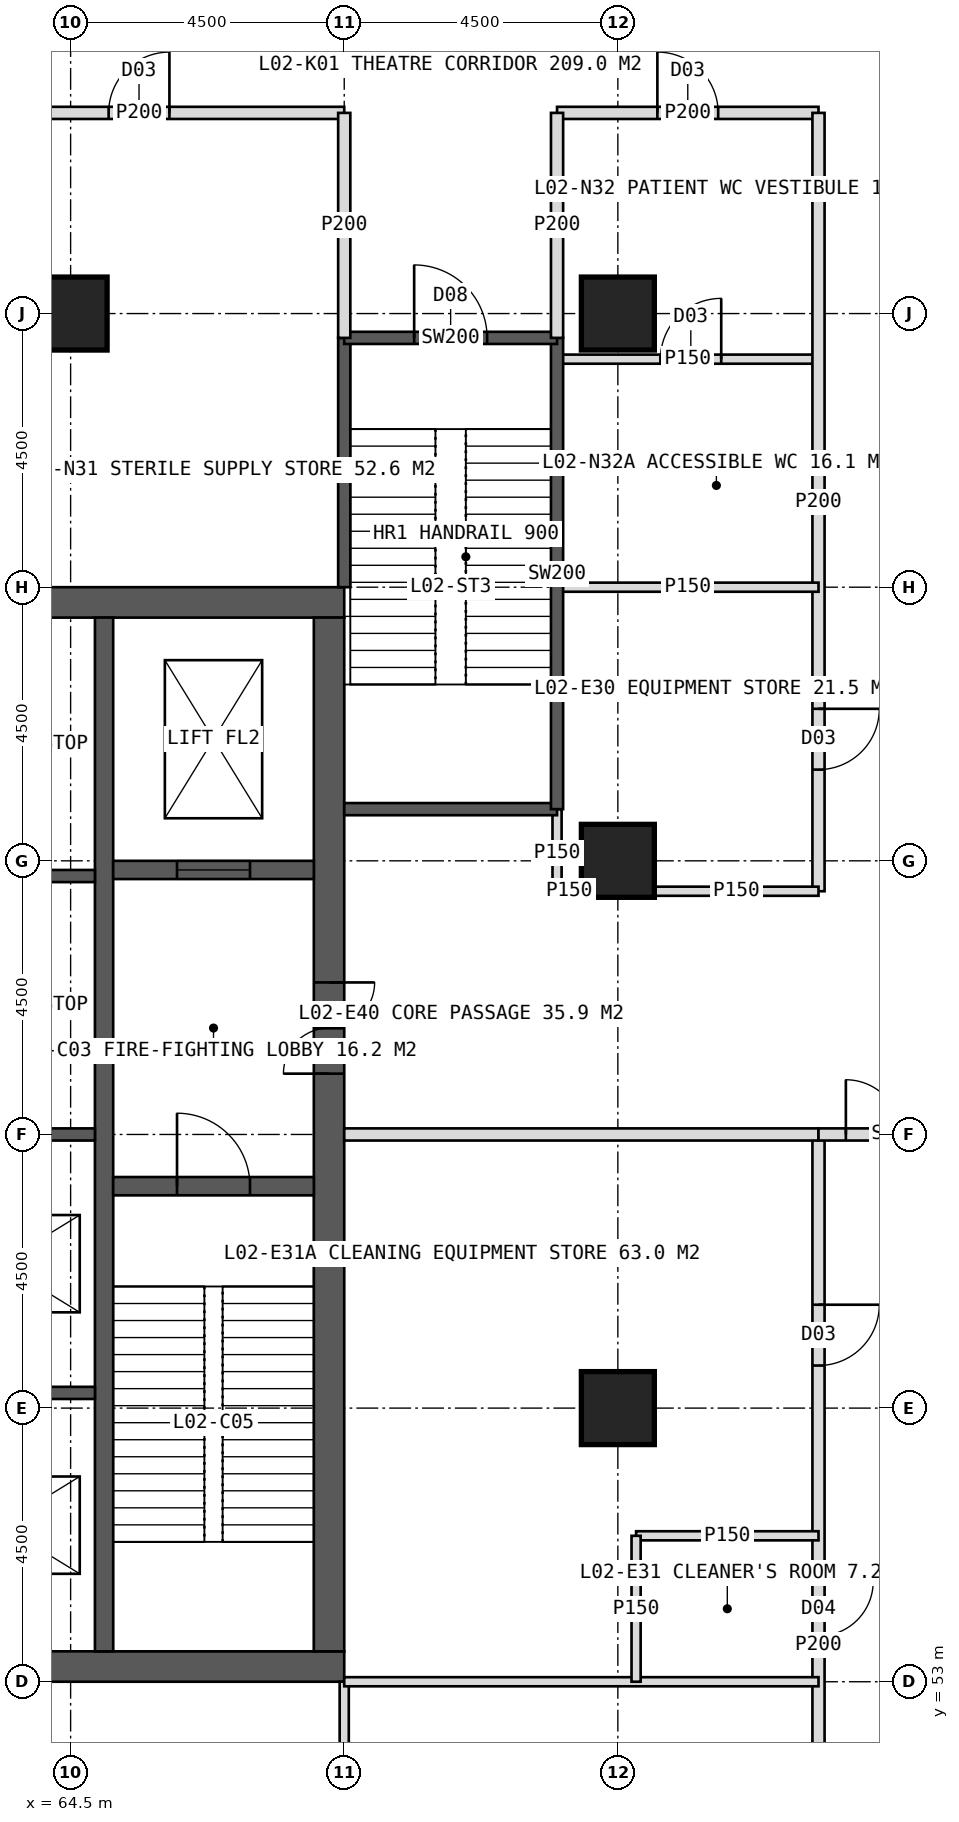
"""IFC4 building model, lengths in metres.
Left out: names, types, materials, properties, quantities, classifications, styles, units other than length and angle.
Written with IfcOpenShell. Run it as: python <this file> out.ifc"""

import sys

from ifc_helpers import new_model, si_unit, direction, frame, frame_2d, origin, origin_2d, place, context, subcontext, project, spatial, rectangle, hollow_rectangle, extrude, element, fill, save


model = new_model("IFC4")
c1 = context("Model", 3, precision=1e-05, world=origin(), true_north=direction((0.0, 1.0)))
c2 = subcontext(c1, "Body", "Model", "MODEL_VIEW")
j1 = project(units=[si_unit("LENGTHUNIT", "METRE"), si_unit("PLANEANGLEUNIT", "RADIAN")], contexts=[c1])
p1 = place(None, origin())
s1 = spatial("IfcSite", under=j1, at=p1, CompositionType="ELEMENT")
p2 = place(p1, origin())
s2 = spatial("IfcBuilding", under=s1, at=p2, CompositionType="ELEMENT")
p3 = place(p2, frame((0.0, 0.0, 11.0)))
s3 = spatial("IfcBuildingStorey", under=s2, at=p3, CompositionType="ELEMENT", Elevation=11.0)
p4 = place(p3, frame((51.0, 70.75, 0.0), z_axis=(0.0, 0.0, 1.0), x_axis=(1.0, 0.0, 0.0)))
e1 = element("IfcWall", 1, at=p4, inside=s3, PredefinedType="SHEAR", context=c2, shape_type="SweptSolid", body=[
    extrude(rectangle(XDim=18.0, YDim=0.5, at=frame_2d((9.0, 0.0))), origin(), (0.0, 0.0, 1.0), 5.5),
])
p5 = place(p4, frame((8.1, 0.0, 0.0)))
e2 = element("IfcOpeningElement", 2, at=p5, cuts=e1, PredefinedType="OPENING", context=c2, shape_type="SweptSolid", body=[
    extrude(rectangle(XDim=1.8, YDim=2.2, at=frame_2d((0.9, 1.1))), frame((0.0, 0.26, 0.0), z_axis=(0.0, -1.0, 0.0), x_axis=(1.0, 0.0, 0.0)), (0.0, 0.0, 1.0), 0.52),
])
p6 = place(p3, frame((51.0, 53.25, 0.0), z_axis=(0.0, 0.0, 1.0), x_axis=(1.0, 0.0, 0.0)))
e3 = element("IfcWall", 3, at=p6, inside=s3, PredefinedType="SHEAR", context=c2, shape_type="SweptSolid", body=[
    extrude(rectangle(XDim=18.0, YDim=0.5, at=frame_2d((9.0, 0.0))), origin(), (0.0, 0.0, 1.0), 5.5),
])
p7 = place(p6, frame((8.1, 0.0, 0.0)))
e4 = element("IfcOpeningElement", 4, at=p7, cuts=e3, PredefinedType="OPENING", context=c2, shape_type="SweptSolid", body=[
    extrude(rectangle(XDim=1.8, YDim=2.2, at=frame_2d((0.9, 1.1))), frame((0.0, 0.26, 0.0), z_axis=(0.0, -1.0, 0.0), x_axis=(1.0, 0.0, 0.0)), (0.0, 0.0, 1.0), 0.52),
])
p8 = place(p3, frame((68.75, 53.5, 0.0), z_axis=(0.0, 0.0, 1.0), x_axis=(0.0, 1.0, 0.0)))
e5 = element("IfcWall", 5, at=p8, inside=s3, PredefinedType="SHEAR", context=c2, shape_type="SweptSolid", body=[
    extrude(rectangle(XDim=17.0, YDim=0.5, at=frame_2d((8.5, 0.0))), origin(), (0.0, 0.0, 1.0), 5.5),
])
p9 = place(p8, frame((9.5, 0.0, 0.0)))
e6 = element("IfcOpeningElement", 6, at=p9, cuts=e5, PredefinedType="OPENING", context=c2, shape_type="SweptSolid", body=[
    extrude(rectangle(XDim=1.5, YDim=2.2, at=frame_2d((0.75, 1.1))), frame((0.0, 0.26, 0.0), z_axis=(0.0, -1.0, 0.0), x_axis=(1.0, 0.0, 0.0)), (0.0, 0.0, 1.0), 0.52),
])
p10 = place(p3, frame((65.05, 53.5, 0.0), z_axis=(0.0, 0.0, 1.0), x_axis=(0.0, 1.0, 0.0)))
e7 = element("IfcWall", 7, at=p10, inside=s3, PredefinedType="SHEAR", context=c2, shape_type="SweptSolid", body=[
    extrude(rectangle(XDim=17.0, YDim=0.3, at=frame_2d((8.5, 0.0))), origin(), (0.0, 0.0, 1.0), 5.5),
])
for number, where, z_axis, x_axis in (
    (8, (61.85, 57.75, 0.0), (0.0, 0.0, 1.0), (1.0, 0.0, 0.0)),
    (9, (61.85, 62.0, 0.0), (0.0, 0.0, 1.0), (1.0, 0.0, 0.0)),
    (10, (61.85, 66.25, 0.0), (0.0, 0.0, 1.0), (1.0, 0.0, 0.0)),
):
    element("IfcWall", number, at=place(p3, frame(where, z_axis=z_axis, x_axis=x_axis)), inside=s3, PredefinedType="SHEAR", context=c2, shape_type="SweptSolid", body=[
        extrude(rectangle(XDim=3.05, YDim=0.2, at=frame_2d((1.525, 0.0))), origin(), (0.0, 0.0, 1.0), 5.5),
    ])
p11 = place(p3, frame((65.2, 61.15, 0.0), z_axis=(0.0, 0.0, 1.0), x_axis=(1.0, 0.0, 0.0)))
e11 = element("IfcWall", 11, at=p11, inside=s3, PredefinedType="SHEAR", context=c2, shape_type="SweptSolid", body=[
    extrude(rectangle(XDim=3.3, YDim=0.3, at=frame_2d((1.65, 0.0))), origin(), (0.0, 0.0, 1.0), 5.5),
])
p12 = place(p11, frame((1.05, 0.0, 0.0)))
e12 = element("IfcOpeningElement", 12, at=p12, cuts=e11, PredefinedType="OPENING", context=c2, shape_type="SweptSolid", body=[
    extrude(rectangle(XDim=1.2, YDim=2.1, at=frame_2d((0.6, 1.05))), frame((0.0, 0.16, 0.0), z_axis=(0.0, -1.0, 0.0), x_axis=(1.0, 0.0, 0.0)), (0.0, 0.0, 1.0), 0.32),
])
p13 = place(p3, frame((65.2, 66.35, 0.0), z_axis=(0.0, 0.0, 1.0), x_axis=(1.0, 0.0, 0.0)))
e13 = element("IfcWall", 13, at=p13, inside=s3, PredefinedType="SHEAR", context=c2, shape_type="SweptSolid", body=[
    extrude(rectangle(XDim=3.3, YDim=0.3, at=frame_2d((1.65, 0.0))), origin(), (0.0, 0.0, 1.0), 5.5),
])
p14 = place(p13, frame((1.05, 0.0, 0.0)))
e14 = element("IfcOpeningElement", 14, at=p14, cuts=e13, PredefinedType="OPENING", context=c2, shape_type="SweptSolid", body=[
    extrude(rectangle(XDim=1.2, YDim=2.2, at=frame_2d((0.6, 1.1))), frame((0.0, 0.16, 0.0), z_axis=(0.0, -1.0, 0.0), x_axis=(1.0, 0.0, 0.0)), (0.0, 0.0, 1.0), 0.32),
])
for number, where, z_axis, x_axis in (
    (15, (73.5, 75.5, 0.0), (0.0, 0.0, 1.0), (1.0, 0.0, 0.0)),
    (16, (64.5, 75.5, 0.0), (0.0, 0.0, 1.0), (1.0, 0.0, 0.0)),
    (17, (73.5, 57.5, 0.0), (0.0, 0.0, 1.0), (1.0, 0.0, 0.0)),
    (18, (73.5, 66.5, 0.0), (0.0, 0.0, 1.0), (1.0, 0.0, 0.0)),
):
    element("IfcColumn", number, at=place(p3, frame(where, z_axis=z_axis, x_axis=x_axis)), inside=s3, PredefinedType="COLUMN", context=c2, shape_type="SweptSolid", body=[
        extrude(hollow_rectangle(XDim=1.2, YDim=1.2, WallThickness=0.1, at=origin_2d()), origin(), (0.0, 0.0, 1.0), 5.5),
    ])
p15 = place(p3, frame((62.25, 78.8, 0.0), z_axis=(0.0, 0.0, 1.0), x_axis=(1.0, 0.0, 0.0)))
e19 = element("IfcWall", 19, at=p15, inside=s3, PredefinedType="PARTITIONING", context=c2, shape_type="SweptSolid", body=[
    extrude(rectangle(XDim=6.75, YDim=0.2, at=frame_2d((3.375, 0.0))), origin(), (0.0, 0.0, 1.0), 5.2),
])
p16 = place(p15, frame((2.875, 0.0, 0.0)))
e20 = element("IfcOpeningElement", 20, at=p16, cuts=e19, PredefinedType="OPENING", context=c2, shape_type="SweptSolid", body=[
    extrude(rectangle(XDim=1.0, YDim=2.1, at=frame_2d((0.5, 1.05))), frame((0.0, 0.11, 0.0), z_axis=(0.0, -1.0, 0.0), x_axis=(1.0, 0.0, 0.0)), (0.0, 0.0, 1.0), 0.22),
])
p17 = place(p3, frame((72.5, 78.8, 0.0), z_axis=(0.0, 0.0, 1.0), x_axis=(1.0, 0.0, 0.0)))
e21 = element("IfcWall", 21, at=p17, inside=s3, PredefinedType="PARTITIONING", context=c2, shape_type="SweptSolid", body=[
    extrude(rectangle(XDim=4.3, YDim=0.2, at=frame_2d((2.15, 0.0))), origin(), (0.0, 0.0, 1.0), 5.2),
])
p18 = place(p17, frame((1.65, 0.0, 0.0)))
e22 = element("IfcOpeningElement", 22, at=p18, cuts=e21, PredefinedType="OPENING", context=c2, shape_type="SweptSolid", body=[
    extrude(rectangle(XDim=1.0, YDim=2.1, at=frame_2d((0.5, 1.05))), frame((0.0, 0.11, 0.0), z_axis=(0.0, -1.0, 0.0), x_axis=(1.0, 0.0, 0.0)), (0.0, 0.0, 1.0), 0.22),
])
p19 = place(p3, frame((72.5, 74.75, 0.0), z_axis=(0.0, 0.0, 1.0), x_axis=(1.0, 0.0, 0.0)))
e23 = element("IfcWall", 23, at=p19, inside=s3, PredefinedType="PARTITIONING", context=c2, shape_type="SweptSolid", body=[
    extrude(rectangle(XDim=4.3, YDim=0.15, at=frame_2d((2.15, 0.0))), origin(), (0.0, 0.0, 1.0), 5.2),
])
p20 = place(p19, frame((1.7, 0.0, 0.0)))
e24 = element("IfcOpeningElement", 24, at=p20, cuts=e23, PredefinedType="OPENING", context=c2, shape_type="SweptSolid", body=[
    extrude(rectangle(XDim=1.0, YDim=2.1, at=frame_2d((0.5, 1.05))), frame((0.0, 0.085, 0.0), z_axis=(0.0, -1.0, 0.0), x_axis=(1.0, 0.0, 0.0)), (0.0, 0.0, 1.0), 0.17),
])
p21 = place(p3, frame((69.0, 53.0, 0.0), z_axis=(0.0, 0.0, 1.0), x_axis=(0.0, -1.0, 0.0)))
e25 = element("IfcWall", 25, at=p21, inside=s3, PredefinedType="PARTITIONING", context=c2, shape_type="SweptSolid", body=[
    extrude(rectangle(XDim=7.8, YDim=0.15, at=frame_2d((3.9, 0.0))), origin(), (0.0, 0.0, 1.0), 5.2),
])
p22 = place(p3, frame((76.8, 78.8, 0.0), z_axis=(0.0, 0.0, 1.0), x_axis=(0.0, -1.0, 0.0)))
e26 = element("IfcWall", 26, at=p22, inside=s3, PredefinedType="PARTITIONING", context=c2, shape_type="SweptSolid", body=[
    extrude(rectangle(XDim=12.8, YDim=0.2, at=frame_2d((6.4, 0.0))), origin(), (0.0, 0.0, 1.0), 5.2),
])
p23 = place(p22, frame((9.8, 0.0, 0.0)))
e27 = element("IfcOpeningElement", 27, at=p23, cuts=e26, PredefinedType="OPENING", context=c2, shape_type="SweptSolid", body=[
    extrude(rectangle(XDim=1.0, YDim=2.1, at=frame_2d((0.5, 1.05))), frame((0.0, 0.11, 0.0), z_axis=(0.0, -1.0, 0.0), x_axis=(1.0, 0.0, 0.0)), (0.0, 0.0, 1.0), 0.22),
])
p24 = place(p3, frame((76.8, 62.0, 0.0), z_axis=(0.0, 0.0, 1.0), x_axis=(0.0, -1.0, 0.0)))
e28 = element("IfcWall", 28, at=p24, inside=s3, PredefinedType="PARTITIONING", context=c2, shape_type="SweptSolid", body=[
    extrude(rectangle(XDim=16.8, YDim=0.2, at=frame_2d((8.4, 0.0))), origin(), (0.0, 0.0, 1.0), 5.2),
])
p25 = place(p24, frame((12.4, 0.0, 0.0)))
e29 = element("IfcOpeningElement", 29, at=p25, cuts=e28, PredefinedType="OPENING", context=c2, shape_type="SweptSolid", body=[
    extrude(rectangle(XDim=1.0, YDim=2.1, at=frame_2d((0.5, 1.05))), frame((0.0, 0.11, 0.0), z_axis=(0.0, -1.0, 0.0), x_axis=(1.0, 0.0, 0.0)), (0.0, 0.0, 1.0), 0.22),
])
p26 = place(p24, frame((7.35, 0.0, 0.0)))
e30 = element("IfcOpeningElement", 30, at=p26, cuts=e28, PredefinedType="OPENING", context=c2, shape_type="SweptSolid", body=[
    extrude(rectangle(XDim=0.9, YDim=2.1, at=frame_2d((0.45, 1.05))), frame((0.0, 0.11, 0.0), z_axis=(0.0, -1.0, 0.0), x_axis=(1.0, 0.0, 0.0)), (0.0, 0.0, 1.0), 0.22),
])
p27 = place(p24, frame((2.8, 0.0, 0.0)))
e31 = element("IfcOpeningElement", 31, at=p27, cuts=e28, PredefinedType="OPENING", context=c2, shape_type="SweptSolid", body=[
    extrude(rectangle(XDim=1.0, YDim=2.1, at=frame_2d((0.5, 1.05))), frame((0.0, 0.11, 0.0), z_axis=(0.0, -1.0, 0.0), x_axis=(1.0, 0.0, 0.0)), (0.0, 0.0, 1.0), 0.22),
])
p28 = place(p3, frame((72.5, 71.0, 0.0), z_axis=(0.0, 0.0, 1.0), x_axis=(1.0, 0.0, 0.0)))
e32 = element("IfcWall", 32, at=p28, inside=s3, PredefinedType="PARTITIONING", context=c2, shape_type="SweptSolid", body=[
    extrude(rectangle(XDim=4.3, YDim=0.15, at=frame_2d((2.15, 0.0))), origin(), (0.0, 0.0, 1.0), 5.2),
])
p29 = place(p3, frame((72.5, 66.0, 0.0), z_axis=(0.0, 0.0, 1.0), x_axis=(1.0, 0.0, 0.0)))
e33 = element("IfcWall", 33, at=p29, inside=s3, PredefinedType="PARTITIONING", context=c2, shape_type="SweptSolid", body=[
    extrude(rectangle(XDim=0.4, YDim=0.15, at=frame_2d((0.2, 0.0))), origin(), (0.0, 0.0, 1.0), 5.2),
])
p30 = place(p3, frame((74.1, 66.0, 0.0), z_axis=(0.0, 0.0, 1.0), x_axis=(1.0, 0.0, 0.0)))
e34 = element("IfcWall", 34, at=p30, inside=s3, PredefinedType="PARTITIONING", context=c2, shape_type="SweptSolid", body=[
    extrude(rectangle(XDim=2.7, YDim=0.15, at=frame_2d((1.35, 0.0))), origin(), (0.0, 0.0, 1.0), 5.2),
])
p31 = place(p3, frame((69.0, 62.0, 0.0), z_axis=(0.0, 0.0, 1.0), x_axis=(1.0, 0.0, 0.0)))
e35 = element("IfcWall", 35, at=p31, inside=s3, PredefinedType="SOLIDWALL", context=c2, shape_type="SweptSolid", body=[
    extrude(rectangle(XDim=7.8, YDim=0.2, at=frame_2d((3.9, 0.0))), origin(), (0.0, 0.0, 1.0), 4.4),
])
p32 = place(p3, frame((69.0, 53.0, 0.0), z_axis=(0.0, 0.0, 1.0), x_axis=(1.0, 0.0, 0.0)))
e36 = element("IfcWall", 36, at=p32, inside=s3, PredefinedType="PARTITIONING", context=c2, shape_type="SweptSolid", body=[
    extrude(rectangle(XDim=7.8, YDim=0.15, at=frame_2d((3.9, 0.0))), origin(), (0.0, 0.0, 1.0), 5.2),
])
p33 = place(p3, frame((73.8, 55.4, 0.0), z_axis=(0.0, 0.0, 1.0), x_axis=(1.0, 0.0, 0.0)))
e37 = element("IfcWall", 37, at=p33, inside=s3, PredefinedType="PARTITIONING", context=c2, shape_type="SweptSolid", body=[
    extrude(rectangle(XDim=3.0, YDim=0.15, at=frame_2d((1.5, 0.0))), origin(), (0.0, 0.0, 1.0), 5.2),
])
p34 = place(p3, frame((73.8, 55.4, 0.0), z_axis=(0.0, 0.0, 1.0), x_axis=(0.0, -1.0, 0.0)))
e38 = element("IfcWall", 38, at=p34, inside=s3, PredefinedType="PARTITIONING", context=c2, shape_type="SweptSolid", body=[
    extrude(rectangle(XDim=2.4, YDim=0.15, at=frame_2d((1.2, 0.0))), origin(), (0.0, 0.0, 1.0), 5.2),
])
p35 = place(p3, frame((76.8, 62.0, 0.0), z_axis=(0.0, 0.0, 1.0), x_axis=(1.0, 0.0, 0.0)))
e39 = element("IfcWall", 39, at=p35, inside=s3, PredefinedType="SOLIDWALL", context=c2, shape_type="SweptSolid", body=[
    extrude(rectangle(XDim=2.7, YDim=0.2, at=frame_2d((1.35, 0.0))), origin(), (0.0, 0.0, 1.0), 4.4),
])
p36 = place(p35, frame((0.45, 0.0, 0.0)))
e40 = element("IfcOpeningElement", 40, at=p36, cuts=e39, PredefinedType="OPENING", context=c2, shape_type="SweptSolid", body=[
    extrude(rectangle(XDim=1.8, YDim=2.2, at=frame_2d((0.9, 1.1))), frame((0.0, 0.11, 0.0), z_axis=(0.0, -1.0, 0.0), x_axis=(1.0, 0.0, 0.0)), (0.0, 0.0, 1.0), 0.22),
])
p37 = place(p3, frame((72.5, 65.9, 0.0), z_axis=(0.0, 0.0, 1.0), x_axis=(0.0, 1.0, 0.0)))
e41 = element("IfcWall", 41, at=p37, inside=s3, PredefinedType="PARTITIONING", context=c2, shape_type="SweptSolid", body=[
    extrude(rectangle(XDim=1.45, YDim=0.15, at=frame_2d((0.725, 0.0))), origin(), (0.0, 0.0, 1.0), 5.2),
])
p38 = place(p3, frame((69.0, 71.0, 0.0), z_axis=(0.0, 0.0, 1.0), x_axis=(0.0, 1.0, 0.0)))
e42 = element("IfcWall", 42, at=p38, inside=s3, PredefinedType="SOLIDWALL", context=c2, shape_type="SweptSolid", body=[
    extrude(rectangle(XDim=4.1, YDim=0.2, at=frame_2d((2.05, 0.0))), origin(), (0.0, 0.0, 1.0), 5.2),
])
p39 = place(p3, frame((69.0, 67.35, 0.0), z_axis=(0.0, 0.0, 1.0), x_axis=(1.0, 0.0, 0.0)))
e43 = element("IfcWall", 43, at=p39, inside=s3, PredefinedType="SOLIDWALL", context=c2, shape_type="SweptSolid", body=[
    extrude(rectangle(XDim=3.5, YDim=0.2, at=frame_2d((1.75, 0.0))), origin(), (0.0, 0.0, 1.0), 5.2),
])
p40 = place(p3, frame((72.5, 67.35, 0.0), z_axis=(0.0, 0.0, 1.0), x_axis=(0.0, 1.0, 0.0)))
e44 = element("IfcWall", 44, at=p40, inside=s3, PredefinedType="SOLIDWALL", context=c2, shape_type="SweptSolid", body=[
    extrude(rectangle(XDim=7.75, YDim=0.2, at=frame_2d((3.875, 0.0))), origin(), (0.0, 0.0, 1.0), 5.2),
])
p41 = place(p3, frame((69.0, 75.1, 0.0), z_axis=(0.0, 0.0, 1.0), x_axis=(1.0, 0.0, 0.0)))
e45 = element("IfcWall", 45, at=p41, inside=s3, PredefinedType="SOLIDWALL", context=c2, shape_type="SweptSolid", body=[
    extrude(rectangle(XDim=3.5, YDim=0.2, at=frame_2d((1.75, 0.0))), origin(), (0.0, 0.0, 1.0), 5.2),
])
p42 = place(p41, frame((1.15, 0.0, 0.0)))
e46 = element("IfcOpeningElement", 46, at=p42, cuts=e45, PredefinedType="OPENING", context=c2, shape_type="SweptSolid", body=[
    extrude(rectangle(XDim=1.2, YDim=2.1, at=frame_2d((0.6, 1.05))), frame((0.0, 0.11, 0.0), z_axis=(0.0, -1.0, 0.0), x_axis=(1.0, 0.0, 0.0)), (0.0, 0.0, 1.0), 0.22),
])
for number, where, z_axis, x_axis in (
    (47, (69.0, 75.1, 0.0), (0.0, 0.0, 1.0), (0.0, 1.0, 0.0)),
    (48, (72.5, 75.1, 0.0), (0.0, 0.0, 1.0), (0.0, 1.0, 0.0)),
):
    element("IfcWall", number, at=place(p3, frame(where, z_axis=z_axis, x_axis=x_axis)), inside=s3, PredefinedType="PARTITIONING", context=c2, shape_type="SweptSolid", body=[
        extrude(rectangle(XDim=3.7, YDim=0.2, at=frame_2d((1.85, 0.0))), origin(), (0.0, 0.0, 1.0), 5.2),
    ])
p43 = place(p16, origin())
e49 = element("IfcDoor", 49, at=p43, inside=s3, OperationType="SINGLE_SWING_RIGHT", PredefinedType="DOOR", context=c2, shape_type="SweptSolid", body=[
    extrude(rectangle(XDim=1.0, YDim=2.1, at=frame_2d((0.5, 1.05))), frame((0.0, 0.025, 0.0), z_axis=(0.0, -1.0, 0.0), x_axis=(1.0, 0.0, 0.0)), (0.0, 0.0, 1.0), 0.05),
])
fill(e20, e49)
p44 = place(p18, origin())
e50 = element("IfcDoor", 50, at=p44, inside=s3, OperationType="SINGLE_SWING_LEFT", PredefinedType="DOOR", context=c2, shape_type="SweptSolid", body=[
    extrude(rectangle(XDim=1.0, YDim=2.1, at=frame_2d((0.5, 1.05))), frame((0.0, 0.025, 0.0), z_axis=(0.0, -1.0, 0.0), x_axis=(1.0, 0.0, 0.0)), (0.0, 0.0, 1.0), 0.05),
])
fill(e22, e50)
p45 = place(p23, origin())
e51 = element("IfcDoor", 51, at=p45, inside=s3, OperationType="SINGLE_SWING_LEFT", PredefinedType="DOOR", context=c2, shape_type="SweptSolid", body=[
    extrude(rectangle(XDim=1.0, YDim=2.1, at=frame_2d((0.5, 1.05))), frame((0.0, 0.025, 0.0), z_axis=(0.0, -1.0, 0.0), x_axis=(1.0, 0.0, 0.0)), (0.0, 0.0, 1.0), 0.05),
])
fill(e27, e51)
p46 = place(p36, origin())
e52 = element("IfcDoor", 52, at=p46, inside=s3, OperationType="DOUBLE_DOOR_DOUBLE_SWING", PredefinedType="DOOR", context=c2, shape_type="SweptSolid", body=[
    extrude(rectangle(XDim=1.8, YDim=2.2, at=frame_2d((0.9, 1.1))), frame((0.0, 0.025, 0.0), z_axis=(0.0, -1.0, 0.0), x_axis=(1.0, 0.0, 0.0)), (0.0, 0.0, 1.0), 0.05),
])
fill(e40, e52)
p47 = place(p9, origin())
e53 = element("IfcDoor", 53, at=p47, inside=s3, OperationType="DOUBLE_DOOR_SINGLE_SWING", PredefinedType="DOOR", context=c2, shape_type="SweptSolid", body=[
    extrude(rectangle(XDim=1.5, YDim=2.2, at=frame_2d((0.75, 1.1))), frame((0.0, 0.025, 0.0), z_axis=(0.0, -1.0, 0.0), x_axis=(1.0, 0.0, 0.0)), (0.0, 0.0, 1.0), 0.05),
])
fill(e6, e53)
p48 = place(p12, origin())
e54 = element("IfcDoor", 54, at=p48, inside=s3, OperationType="SINGLE_SWING_LEFT", PredefinedType="DOOR", context=c2, shape_type="SweptSolid", body=[
    extrude(rectangle(XDim=1.2, YDim=2.1, at=frame_2d((0.6, 1.05))), frame((0.0, 0.025, 0.0), z_axis=(0.0, -1.0, 0.0), x_axis=(1.0, 0.0, 0.0)), (0.0, 0.0, 1.0), 0.05),
])
fill(e12, e54)
p49 = place(p14, origin())
e55 = element("IfcDoor", 55, at=p49, inside=s3, OperationType="SLIDING_TO_LEFT", PredefinedType="DOOR", context=c2, shape_type="SweptSolid", body=[
    extrude(rectangle(XDim=1.2, YDim=2.2, at=frame_2d((0.6, 1.1))), frame((0.0, 0.025, 0.0), z_axis=(0.0, -1.0, 0.0), x_axis=(1.0, 0.0, 0.0)), (0.0, 0.0, 1.0), 0.05),
])
fill(e14, e55)
p50 = place(p20, origin())
e56 = element("IfcDoor", 56, at=p50, inside=s3, OperationType="SINGLE_SWING_RIGHT", PredefinedType="DOOR", context=c2, shape_type="SweptSolid", body=[
    extrude(rectangle(XDim=1.0, YDim=2.1, at=frame_2d((0.5, 1.05))), frame((0.0, 0.025, 0.0), z_axis=(0.0, -1.0, 0.0), x_axis=(1.0, 0.0, 0.0)), (0.0, 0.0, 1.0), 0.05),
])
fill(e24, e56)
p51 = place(p26, origin())
e57 = element("IfcDoor", 57, at=p51, inside=s3, OperationType="SINGLE_SWING_LEFT", PredefinedType="DOOR", context=c2, shape_type="SweptSolid", body=[
    extrude(rectangle(XDim=0.9, YDim=2.1, at=frame_2d((0.45, 1.05))), frame((0.0, 0.025, 0.0), z_axis=(0.0, -1.0, 0.0), x_axis=(1.0, 0.0, 0.0)), (0.0, 0.0, 1.0), 0.05),
])
fill(e30, e57)
p52 = place(p27, origin())
e58 = element("IfcDoor", 58, at=p52, inside=s3, OperationType="SINGLE_SWING_LEFT", PredefinedType="DOOR", context=c2, shape_type="SweptSolid", body=[
    extrude(rectangle(XDim=1.0, YDim=2.1, at=frame_2d((0.5, 1.05))), frame((0.0, 0.025, 0.0), z_axis=(0.0, -1.0, 0.0), x_axis=(1.0, 0.0, 0.0)), (0.0, 0.0, 1.0), 0.05),
])
fill(e31, e58)
p53 = place(p42, origin())
e59 = element("IfcDoor", 59, at=p53, inside=s3, OperationType="SINGLE_SWING_LEFT", PredefinedType="DOOR", context=c2, shape_type="SweptSolid", body=[
    extrude(rectangle(XDim=1.2, YDim=2.1, at=frame_2d((0.6, 1.05))), frame((0.0, 0.025, 0.0), z_axis=(0.0, -1.0, 0.0), x_axis=(1.0, 0.0, 0.0)), (0.0, 0.0, 1.0), 0.05),
])
fill(e46, e59)
save(model, sys.argv[1])
